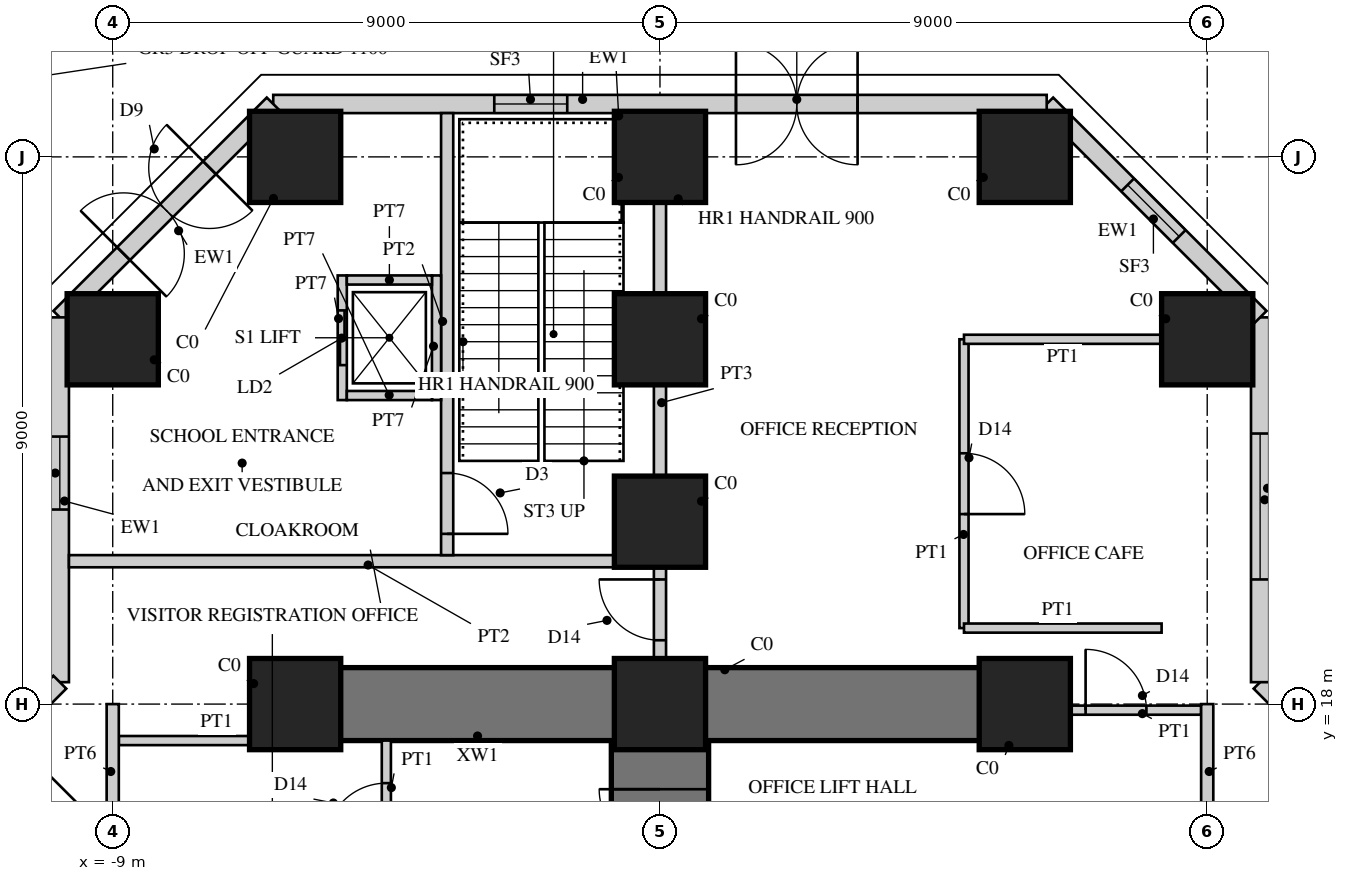
"""IFC4 building model, lengths in metres.
Left out: names, types, materials, properties, quantities, classifications, styles, units other than length and angle.
Written with IfcOpenShell. Run it as: python <this file> out.ifc"""

import sys

from ifc_helpers import new_model, si_unit, direction, frame, frame_2d, origin, origin_2d, place, context, subcontext, project, spatial, rectangle, hollow_rectangle, extrude, element, fill, save


model = new_model("IFC4")
c1 = context("Model", 3, precision=1e-05, world=origin(), true_north=direction((0.0, 1.0)))
c2 = subcontext(c1, "Body", "Model", "MODEL_VIEW")
j1 = project(units=[si_unit("LENGTHUNIT", "METRE"), si_unit("PLANEANGLEUNIT", "RADIAN")], contexts=[c1])
p1 = place(None, origin())
s1 = spatial("IfcSite", under=j1, at=p1, CompositionType="ELEMENT")
p2 = place(p1, origin())
s2 = spatial("IfcBuilding", under=s1, at=p2, CompositionType="ELEMENT")
p3 = place(p2, origin())
s3 = spatial("IfcBuildingStorey", under=s2, at=p3, CompositionType="ELEMENT", Elevation=0.0)
p4 = place(p3, frame((0.0, 9.0, 0.0), z_axis=(0.0, 0.0, 1.0), x_axis=(0.0, 1.0, 0.0)))
e1 = element("IfcWall", 1, at=p4, inside=s3, PredefinedType="SHEAR", context=c2, shape_type="SweptSolid", body=[
    extrude(rectangle(XDim=9.0, YDim=1.6, at=frame_2d((4.5, 0.0))), origin(), (0.0, 0.0, 1.0), 5.0),
])
p5 = place(p4, frame((6.6, 0.0, 0.0)))
e2 = element("IfcOpeningElement", 2, at=p5, cuts=e1, PredefinedType="OPENING", context=c2, shape_type="SweptSolid", body=[
    extrude(rectangle(XDim=1.0, YDim=2.2, at=frame_2d((0.5, 1.1))), frame((0.0, 0.81, 0.0), z_axis=(0.0, -1.0, 0.0), x_axis=(1.0, 0.0, 0.0)), (0.0, 0.0, 1.0), 1.62),
])
for number, where, z_axis, x_axis in (
    (3, (0.0, 18.0, 0.0), (0.0, 0.0, 1.0), (-1.0, 0.0, 0.0)),
    (4, (0.0, 18.0, 0.0), (0.0, 0.0, 1.0), (1.0, 0.0, 0.0)),
):
    element("IfcWall", number, at=place(p3, frame(where, z_axis=z_axis, x_axis=x_axis)), inside=s3, PredefinedType="SHEAR", context=c2, shape_type="SweptSolid", body=[
        extrude(rectangle(XDim=6.0, YDim=1.2, at=frame_2d((3.0, 0.0))), origin(), (0.0, 0.0, 1.0), 5.0),
    ])
for number, where, z_axis, x_axis in (
    (5, (9.0, 24.0, 0.0), (0.0, 0.0, 1.0), (1.0, 0.0, 0.0)),
    (6, (-9.0, 24.0, 0.0), (0.0, 0.0, 1.0), (1.0, 0.0, 0.0)),
    (7, (6.0, 27.0, 0.0), (0.0, 0.0, 1.0), (1.0, 0.0, 0.0)),
    (8, (0.0, 27.0, 0.0), (0.0, 0.0, 1.0), (1.0, 0.0, 0.0)),
    (9, (-6.0, 27.0, 0.0), (0.0, 0.0, 1.0), (1.0, 0.0, 0.0)),
    (10, (6.0, 18.0, 0.0), (0.0, 0.0, 1.0), (1.0, 0.0, 0.0)),
    (11, (0.0, 18.0, 0.0), (0.0, 0.0, 1.0), (1.0, 0.0, 0.0)),
    (12, (-6.0, 18.0, 0.0), (0.0, 0.0, 1.0), (1.0, 0.0, 0.0)),
    (13, (0.0, 21.0, 0.0), (0.0, 0.0, 1.0), (1.0, 0.0, 0.0)),
    (14, (0.0, 24.0, 0.0), (0.0, 0.0, 1.0), (1.0, 0.0, 0.0)),
):
    element("IfcColumn", number, at=place(p3, frame(where, z_axis=z_axis, x_axis=x_axis)), inside=s3, PredefinedType="COLUMN", context=c2, shape_type="SweptSolid", body=[
        extrude(rectangle(XDim=1.5, YDim=1.5, at=origin_2d()), origin(), (0.0, 0.0, 1.0), 5.0),
    ])
p6 = place(p3, frame((18.36, 9.87, 0.0), z_axis=(0.0, 0.0, 1.0), x_axis=(-0.707106781187, 0.707106781187, 0.0)))
e15 = element("IfcWall", 15, at=p6, inside=s3, PredefinedType="SOLIDWALL", context=c2, shape_type="SweptSolid", body=[
    extrude(rectangle(XDim=12.007, YDim=0.3, at=frame_2d((6.003, 0.0))), origin(), (0.0, 0.0, 1.0), 4.8),
])
p7 = place(p6, frame((1.034, 0.0, 0.3)))
e16 = element("IfcOpeningElement", 16, at=p7, cuts=e15, PredefinedType="OPENING", context=c2, shape_type="SweptSolid", body=[
    extrude(rectangle(XDim=3.6, YDim=3.9, at=frame_2d((1.8, 1.95))), frame((0.0, 0.16, 0.0), z_axis=(0.0, -1.0, 0.0), x_axis=(1.0, 0.0, 0.0)), (0.0, 0.0, 1.0), 0.32),
])
p8 = place(p6, frame((8.637, 0.0, 0.3)))
e17 = element("IfcOpeningElement", 17, at=p8, cuts=e15, PredefinedType="OPENING", context=c2, shape_type="SweptSolid", body=[
    extrude(rectangle(XDim=2.4, YDim=3.9, at=frame_2d((1.2, 1.95))), frame((0.0, 0.16, 0.0), z_axis=(0.0, -1.0, 0.0), x_axis=(1.0, 0.0, 0.0)), (0.0, 0.0, 1.0), 0.32),
])
p9 = place(p3, frame((9.87, 18.36, 0.0), z_axis=(0.0, 0.0, 1.0), x_axis=(0.0, 1.0, 0.0)))
e18 = element("IfcWall", 18, at=p9, inside=s3, PredefinedType="SOLIDWALL", context=c2, shape_type="SweptSolid", body=[
    extrude(rectangle(XDim=6.0, YDim=0.3, at=frame_2d((3.0, 0.0))), origin(), (0.0, 0.0, 1.0), 4.8),
])
p10 = place(p9, frame((1.69, 0.0, 0.3)))
e19 = element("IfcOpeningElement", 19, at=p10, cuts=e18, PredefinedType="OPENING", context=c2, shape_type="SweptSolid", body=[
    extrude(rectangle(XDim=2.4, YDim=3.9, at=frame_2d((1.2, 1.95))), frame((0.0, 0.16, 0.0), z_axis=(0.0, -1.0, 0.0), x_axis=(1.0, 0.0, 0.0)), (0.0, 0.0, 1.0), 0.32),
])
p11 = place(p3, frame((9.87, 24.36, 0.0), z_axis=(0.0, 0.0, 1.0), x_axis=(-0.707106781187, 0.707106781187, 0.0)))
e20 = element("IfcWall", 20, at=p11, inside=s3, PredefinedType="SOLIDWALL", context=c2, shape_type="SweptSolid", body=[
    extrude(rectangle(XDim=4.964, YDim=0.3, at=frame_2d((2.482, 0.0))), origin(), (0.0, 0.0, 1.0), 4.8),
])
p12 = place(p11, frame((1.882, 0.0, 0.3)))
e21 = element("IfcOpeningElement", 21, at=p12, cuts=e20, PredefinedType="OPENING", context=c2, shape_type="SweptSolid", body=[
    extrude(rectangle(XDim=1.2, YDim=3.9, at=frame_2d((0.6, 1.95))), frame((0.0, 0.16, 0.0), z_axis=(0.0, -1.0, 0.0), x_axis=(1.0, 0.0, 0.0)), (0.0, 0.0, 1.0), 0.32),
])
p13 = place(p3, frame((6.36, 27.87, 0.0), z_axis=(0.0, 0.0, 1.0), x_axis=(-1.0, 0.0, 0.0)))
e22 = element("IfcWall", 22, at=p13, inside=s3, PredefinedType="SOLIDWALL", context=c2, shape_type="SweptSolid", body=[
    extrude(rectangle(XDim=12.721, YDim=0.3, at=frame_2d((6.36, 0.0))), origin(), (0.0, 0.0, 1.0), 4.8),
])
p14 = place(p13, frame((3.11, 0.0, 0.0)))
e23 = element("IfcOpeningElement", 23, at=p14, cuts=e22, PredefinedType="OPENING", context=c2, shape_type="SweptSolid", body=[
    extrude(rectangle(XDim=2.0, YDim=2.6, at=frame_2d((1.0, 1.3))), frame((0.0, 0.16, 0.0), z_axis=(0.0, -1.0, 0.0), x_axis=(1.0, 0.0, 0.0)), (0.0, 0.0, 1.0), 0.32),
])
p15 = place(p13, frame((7.885, 0.0, 0.3)))
e24 = element("IfcOpeningElement", 24, at=p15, cuts=e22, PredefinedType="OPENING", context=c2, shape_type="SweptSolid", body=[
    extrude(rectangle(XDim=1.2, YDim=3.9, at=frame_2d((0.6, 1.95))), frame((0.0, 0.16, 0.0), z_axis=(0.0, -1.0, 0.0), x_axis=(1.0, 0.0, 0.0)), (0.0, 0.0, 1.0), 0.32),
])
p16 = place(p3, frame((-6.36, 27.87, 0.0), z_axis=(0.0, 0.0, 1.0), x_axis=(-0.707106781187, -0.707106781187, 0.0)))
e25 = element("IfcWall", 25, at=p16, inside=s3, PredefinedType="SOLIDWALL", context=c2, shape_type="SweptSolid", body=[
    extrude(rectangle(XDim=4.964, YDim=0.3, at=frame_2d((2.482, 0.0))), origin(), (0.0, 0.0, 1.0), 4.8),
])
p17 = place(p16, frame((1.482, 0.0, 0.0)))
e26 = element("IfcOpeningElement", 26, at=p17, cuts=e25, PredefinedType="OPENING", context=c2, shape_type="SweptSolid", body=[
    extrude(rectangle(XDim=2.0, YDim=2.6, at=frame_2d((1.0, 1.3))), frame((0.0, 0.16, 0.0), z_axis=(0.0, -1.0, 0.0), x_axis=(1.0, 0.0, 0.0)), (0.0, 0.0, 1.0), 0.32),
])
p18 = place(p3, frame((-9.87, 24.36, 0.0), z_axis=(0.0, 0.0, 1.0), x_axis=(0.0, -1.0, 0.0)))
e27 = element("IfcWall", 27, at=p18, inside=s3, PredefinedType="SOLIDWALL", context=c2, shape_type="SweptSolid", body=[
    extrude(rectangle(XDim=6.0, YDim=0.3, at=frame_2d((3.0, 0.0))), origin(), (0.0, 0.0, 1.0), 4.8),
])
p19 = place(p18, frame((1.96, 0.0, 0.3)))
e28 = element("IfcOpeningElement", 28, at=p19, cuts=e27, PredefinedType="OPENING", context=c2, shape_type="SweptSolid", body=[
    extrude(rectangle(XDim=1.2, YDim=3.9, at=frame_2d((0.6, 1.95))), frame((0.0, 0.16, 0.0), z_axis=(0.0, -1.0, 0.0), x_axis=(1.0, 0.0, 0.0)), (0.0, 0.0, 1.0), 0.32),
])
p20 = place(p3, frame((-9.87, 18.36, 0.0), z_axis=(0.0, 0.0, 1.0), x_axis=(-0.707106781187, -0.707106781187, 0.0)))
e29 = element("IfcWall", 29, at=p20, inside=s3, PredefinedType="SOLIDWALL", context=c2, shape_type="SweptSolid", body=[
    extrude(rectangle(XDim=12.007, YDim=0.3, at=frame_2d((6.003, 0.0))), origin(), (0.0, 0.0, 1.0), 4.8),
])
p21 = place(p20, frame((1.204, 0.0, 0.0)))
e30 = element("IfcOpeningElement", 30, at=p21, cuts=e29, PredefinedType="OPENING", context=c2, shape_type="SweptSolid", body=[
    extrude(rectangle(XDim=3.6, YDim=4.2, at=frame_2d((1.8, 2.1))), frame((0.0, 0.16, 0.0), z_axis=(0.0, -1.0, 0.0), x_axis=(1.0, 0.0, 0.0)), (0.0, 0.0, 1.0), 0.32),
])
p22 = place(p3, frame((-4.5, 15.0, 0.0), z_axis=(0.0, 0.0, 1.0), x_axis=(0.0, 1.0, 0.0)))
e31 = element("IfcWall", 31, at=p22, inside=s3, PredefinedType="PARTITIONING", context=c2, shape_type="SweptSolid", body=[
    extrude(rectangle(XDim=2.4, YDim=0.15, at=frame_2d((1.2, 0.0))), origin(), (0.0, 0.0, 1.0), 4.8),
])
p23 = place(p22, frame((0.7, 0.0, 0.0)))
e32 = element("IfcOpeningElement", 32, at=p23, cuts=e31, PredefinedType="OPENING", context=c2, shape_type="SweptSolid", body=[
    extrude(rectangle(XDim=1.0, YDim=2.2, at=frame_2d((0.5, 1.1))), frame((0.0, 0.085, 0.0), z_axis=(0.0, -1.0, 0.0), x_axis=(1.0, 0.0, 0.0)), (0.0, 0.0, 1.0), 0.17),
])
p24 = place(p3, frame((-0.1, 20.35, 0.0), z_axis=(0.0, 0.0, 1.0), x_axis=(-1.0, 0.0, 0.0)))
e33 = element("IfcWall", 33, at=p24, inside=s3, PredefinedType="SOLIDWALL", context=c2, shape_type="SweptSolid", body=[
    extrude(rectangle(XDim=9.62, YDim=0.2, at=frame_2d((4.81, 0.0))), origin(), (0.0, 0.0, 1.0), 4.8),
])
p25 = place(p3, frame((-3.5, 20.45, 0.0), z_axis=(0.0, 0.0, 1.0), x_axis=(0.0, 1.0, 0.0)))
e34 = element("IfcWall", 34, at=p25, inside=s3, PredefinedType="SOLIDWALL", context=c2, shape_type="SweptSolid", body=[
    extrude(rectangle(XDim=7.27, YDim=0.2, at=frame_2d((3.635, 0.0))), origin(), (0.0, 0.0, 1.0), 4.8),
])
p26 = place(p25, frame((0.35, 0.0, 0.0)))
e35 = element("IfcOpeningElement", 35, at=p26, cuts=e34, PredefinedType="OPENING", context=c2, shape_type="SweptSolid", body=[
    extrude(rectangle(XDim=1.0, YDim=2.1, at=frame_2d((0.5, 1.05))), frame((0.0, 0.11, 0.0), z_axis=(0.0, -1.0, 0.0), x_axis=(1.0, 0.0, 0.0)), (0.0, 0.0, 1.0), 0.22),
])
p27 = place(p3, frame((-3.675, 23.0, 0.0), z_axis=(0.0, 0.0, 1.0), x_axis=(0.0, 1.0, 0.0)))
e36 = element("IfcWall", 36, at=p27, inside=s3, PredefinedType="PARTITIONING", context=c2, shape_type="SweptSolid", body=[
    extrude(rectangle(XDim=2.05, YDim=0.15, at=frame_2d((1.025, 0.0))), origin(), (0.0, 0.0, 1.0), 4.8),
])
p28 = place(p3, frame((-5.225, 23.0, 0.0), z_axis=(0.0, 0.0, 1.0), x_axis=(0.0, 1.0, 0.0)))
e37 = element("IfcWall", 37, at=p28, inside=s3, PredefinedType="PARTITIONING", context=c2, shape_type="SweptSolid", body=[
    extrude(rectangle(XDim=2.05, YDim=0.15, at=frame_2d((1.025, 0.0))), origin(), (0.0, 0.0, 1.0), 4.8),
])
p29 = place(p28, frame((0.575, 0.0, 0.0)))
e38 = element("IfcOpeningElement", 38, at=p29, cuts=e37, PredefinedType="OPENING", context=c2, shape_type="SweptSolid", body=[
    extrude(rectangle(XDim=0.9, YDim=2.1, at=frame_2d((0.45, 1.05))), frame((0.0, 0.085, 0.0), z_axis=(0.0, -1.0, 0.0), x_axis=(1.0, 0.0, 0.0)), (0.0, 0.0, 1.0), 0.17),
])
for number, where, z_axis, x_axis in (
    (39, (-3.75, 23.075, 0.0), (0.0, 0.0, 1.0), (-1.0, 0.0, 0.0)),
    (40, (-3.75, 24.975, 0.0), (0.0, 0.0, 1.0), (-1.0, 0.0, 0.0)),
):
    element("IfcWall", number, at=place(p3, frame(where, z_axis=z_axis, x_axis=x_axis)), inside=s3, PredefinedType="PARTITIONING", context=c2, shape_type="SweptSolid", body=[
        extrude(rectangle(XDim=1.4, YDim=0.15, at=frame_2d((0.7, 0.0))), origin(), (0.0, 0.0, 1.0), 4.8),
    ])
p30 = place(p3, frame((5.0, 19.25, 0.0), z_axis=(0.0, 0.0, 1.0), x_axis=(0.0, 1.0, 0.0)))
e41 = element("IfcWall", 41, at=p30, inside=s3, PredefinedType="PARTITIONING", context=c2, shape_type="SweptSolid", body=[
    extrude(rectangle(XDim=4.75, YDim=0.15, at=frame_2d((2.375, 0.0))), origin(), (0.0, 0.0, 1.0), 4.8),
])
p31 = place(p30, frame((1.875, 0.0, 0.0)))
e42 = element("IfcOpeningElement", 42, at=p31, cuts=e41, PredefinedType="OPENING", context=c2, shape_type="SweptSolid", body=[
    extrude(rectangle(XDim=1.0, YDim=2.2, at=frame_2d((0.5, 1.1))), frame((0.0, 0.085, 0.0), z_axis=(0.0, -1.0, 0.0), x_axis=(1.0, 0.0, 0.0)), (0.0, 0.0, 1.0), 0.17),
])
for number, where, z_axis, x_axis in (
    (43, (8.25, 19.25, 0.0), (0.0, 0.0, 1.0), (-1.0, 0.0, 0.0)),
    (44, (8.25, 24.0, 0.0), (0.0, 0.0, 1.0), (-1.0, 0.0, 0.0)),
):
    element("IfcWall", number, at=place(p3, frame(where, z_axis=z_axis, x_axis=x_axis)), inside=s3, PredefinedType="PARTITIONING", context=c2, shape_type="SweptSolid", body=[
        extrude(rectangle(XDim=3.25, YDim=0.15, at=frame_2d((1.625, 0.0))), origin(), (0.0, 0.0, 1.0), 4.8),
    ])
p32 = place(p3, frame((-6.75, 17.4, 0.0), z_axis=(0.0, 0.0, 1.0), x_axis=(-1.0, 0.0, 0.0)))
e45 = element("IfcWall", 45, at=p32, inside=s3, PredefinedType="PARTITIONING", context=c2, shape_type="SweptSolid", body=[
    extrude(rectangle(XDim=2.15, YDim=0.15, at=frame_2d((1.075, 0.0))), origin(), (0.0, 0.0, 1.0), 4.8),
])
p33 = place(p3, frame((6.75, 17.9, 0.0), z_axis=(0.0, 0.0, 1.0), x_axis=(1.0, 0.0, 0.0)))
e46 = element("IfcWall", 46, at=p33, inside=s3, PredefinedType="PARTITIONING", context=c2, shape_type="SweptSolid", body=[
    extrude(rectangle(XDim=2.15, YDim=0.15, at=frame_2d((1.075, 0.0))), origin(), (0.0, 0.0, 1.0), 3.85),
])
p34 = place(p33, frame((0.25, 0.0, 0.0)))
e47 = element("IfcOpeningElement", 47, at=p34, cuts=e46, PredefinedType="OPENING", context=c2, shape_type="SweptSolid", body=[
    extrude(rectangle(XDim=1.0, YDim=2.2, at=frame_2d((0.5, 1.1))), frame((0.0, 0.085, 0.0), z_axis=(0.0, -1.0, 0.0), x_axis=(1.0, 0.0, 0.0)), (0.0, 0.0, 1.0), 0.17),
])
for number, where, z_axis, x_axis in (
    (48, (-9.0, 15.75, 0.0), (0.0, 0.0, 1.0), (0.0, 1.0, 0.0)),
    (49, (9.0, 18.0, 0.0), (0.0, 0.0, 1.0), (0.0, -1.0, 0.0)),
):
    element("IfcWall", number, at=place(p3, frame(where, z_axis=z_axis, x_axis=x_axis)), inside=s3, PredefinedType="SOLIDWALL", context=c2, shape_type="SweptSolid", body=[
        extrude(rectangle(XDim=2.25, YDim=0.2, at=frame_2d((1.125, 0.0))), origin(), (0.0, 0.0, 1.0), 3.8),
    ])
p35 = place(p3, frame((0.0, 18.0, 0.0), z_axis=(0.0, 0.0, 1.0), x_axis=(0.0, 1.0, 0.0)))
e50 = element("IfcWall", 50, at=p35, inside=s3, PredefinedType="SOLIDWALL", context=c2, shape_type="SweptSolid", body=[
    extrude(rectangle(XDim=3.0, YDim=0.2, at=frame_2d((1.5, 0.0))), origin(), (0.0, 0.0, 1.0), 4.8),
])
p36 = place(p35, frame((1.05, 0.0, 0.0)))
e51 = element("IfcOpeningElement", 51, at=p36, cuts=e50, PredefinedType="OPENING", context=c2, shape_type="SweptSolid", body=[
    extrude(rectangle(XDim=1.0, YDim=2.2, at=frame_2d((0.5, 1.1))), frame((0.0, 0.11, 0.0), z_axis=(0.0, -1.0, 0.0), x_axis=(1.0, 0.0, 0.0)), (0.0, 0.0, 1.0), 0.22),
])
p37 = place(p3, frame((0.0, 21.0, 0.0), z_axis=(0.0, 0.0, 1.0), x_axis=(0.0, 1.0, 0.0)))
e52 = element("IfcWall", 52, at=p37, inside=s3, PredefinedType="SOLIDWALL", context=c2, shape_type="SweptSolid", body=[
    extrude(rectangle(XDim=6.0, YDim=0.2, at=frame_2d((3.0, 0.0))), origin(), (0.0, 0.0, 1.0), 3.8),
])
p38 = place(p10, origin())
e53 = element("IfcWindow", 53, at=p38, inside=s3, PartitioningType="SINGLE_PANEL", PredefinedType="WINDOW", context=c2, shape_type="SweptSolid", body=[
    extrude(hollow_rectangle(XDim=2.4, YDim=3.9, WallThickness=0.06, at=frame_2d((1.2, 1.95))), frame((0.0, 0.03, 0.0), z_axis=(0.0, -1.0, 0.0), x_axis=(1.0, 0.0, 0.0)), (0.0, 0.0, 1.0), 0.06),
    extrude(rectangle(XDim=2.279, YDim=3.779, at=frame_2d((1.2, 1.95))), frame((0.0, 0.03, 0.0), z_axis=(0.0, -1.0, 0.0), x_axis=(1.0, 0.0, 0.0)), (0.0, 0.0, 1.0), 0.06),
])
fill(e19, e53)
p39 = place(p12, origin())
e54 = element("IfcWindow", 54, at=p39, inside=s3, PartitioningType="SINGLE_PANEL", PredefinedType="WINDOW", context=c2, shape_type="SweptSolid", body=[
    extrude(hollow_rectangle(XDim=1.2, YDim=3.9, WallThickness=0.06, at=frame_2d((0.6, 1.95))), frame((0.0, 0.03, 0.0), z_axis=(0.0, -1.0, 0.0), x_axis=(1.0, 0.0, 0.0)), (0.0, 0.0, 1.0), 0.06),
    extrude(rectangle(XDim=1.079, YDim=3.779, at=frame_2d((0.6, 1.95))), frame((0.0, 0.03, 0.0), z_axis=(0.0, -1.0, 0.0), x_axis=(1.0, 0.0, 0.0)), (0.0, 0.0, 1.0), 0.06),
])
fill(e21, e54)
p40 = place(p14, origin())
e55 = element("IfcDoor", 55, at=p40, inside=s3, OperationType="DOUBLE_DOOR_DOUBLE_SWING", PredefinedType="DOOR", context=c2, shape_type="SweptSolid", body=[
    extrude(hollow_rectangle(XDim=2.0, YDim=2.6, WallThickness=0.06, at=frame_2d((1.0, 1.3))), frame((0.0, 0.025, 0.0), z_axis=(0.0, -1.0, 0.0), x_axis=(1.0, 0.0, 0.0)), (0.0, 0.0, 1.0), 0.05),
    extrude(rectangle(XDim=1.879, YDim=2.479, at=frame_2d((1.0, 1.3))), frame((0.0, 0.025, 0.0), z_axis=(0.0, -1.0, 0.0), x_axis=(1.0, 0.0, 0.0)), (0.0, 0.0, 1.0), 0.05),
])
fill(e23, e55)
p41 = place(p15, origin())
e56 = element("IfcWindow", 56, at=p41, inside=s3, PartitioningType="SINGLE_PANEL", PredefinedType="WINDOW", context=c2, shape_type="SweptSolid", body=[
    extrude(hollow_rectangle(XDim=1.2, YDim=3.9, WallThickness=0.06, at=frame_2d((0.6, 1.95))), frame((0.0, 0.03, 0.0), z_axis=(0.0, -1.0, 0.0), x_axis=(1.0, 0.0, 0.0)), (0.0, 0.0, 1.0), 0.06),
    extrude(rectangle(XDim=1.079, YDim=3.779, at=frame_2d((0.6, 1.95))), frame((0.0, 0.03, 0.0), z_axis=(0.0, -1.0, 0.0), x_axis=(1.0, 0.0, 0.0)), (0.0, 0.0, 1.0), 0.06),
])
fill(e24, e56)
p42 = place(p19, origin())
e57 = element("IfcWindow", 57, at=p42, inside=s3, PartitioningType="SINGLE_PANEL", PredefinedType="WINDOW", context=c2, shape_type="SweptSolid", body=[
    extrude(hollow_rectangle(XDim=1.2, YDim=3.9, WallThickness=0.06, at=frame_2d((0.6, 1.95))), frame((0.0, 0.03, 0.0), z_axis=(0.0, -1.0, 0.0), x_axis=(1.0, 0.0, 0.0)), (0.0, 0.0, 1.0), 0.06),
    extrude(rectangle(XDim=1.079, YDim=3.779, at=frame_2d((0.6, 1.95))), frame((0.0, 0.03, 0.0), z_axis=(0.0, -1.0, 0.0), x_axis=(1.0, 0.0, 0.0)), (0.0, 0.0, 1.0), 0.06),
])
fill(e28, e57)
p43 = place(p23, origin())
e58 = element("IfcDoor", 58, at=p43, inside=s3, OperationType="SINGLE_SWING_LEFT", PredefinedType="DOOR", context=c2, shape_type="SweptSolid", body=[
    extrude(rectangle(XDim=1.0, YDim=2.2, at=frame_2d((0.5, 1.1))), frame((0.0, 0.025, 0.0), z_axis=(0.0, -1.0, 0.0), x_axis=(1.0, 0.0, 0.0)), (0.0, 0.0, 1.0), 0.05),
])
fill(e32, e58)
p44 = place(p26, frame((1.0, 0.0, 0.0), z_axis=(0.0, 0.0, 1.0), x_axis=(-1.0, 0.0, 0.0)))
e59 = element("IfcDoor", 59, at=p44, inside=s3, OperationType="SINGLE_SWING_RIGHT", PredefinedType="DOOR", context=c2, shape_type="SweptSolid", body=[
    extrude(rectangle(XDim=1.0, YDim=2.1, at=frame_2d((0.5, 1.05))), frame((0.0, 0.025, 0.0), z_axis=(0.0, -1.0, 0.0), x_axis=(1.0, 0.0, 0.0)), (0.0, 0.0, 1.0), 0.05),
])
fill(e35, e59)
p45 = place(p29, origin())
e60 = element("IfcDoor", 60, at=p45, inside=s3, OperationType="DOUBLE_DOOR_SLIDING", PredefinedType="DOOR", context=c2, shape_type="SweptSolid", body=[
    extrude(rectangle(XDim=0.9, YDim=2.1, at=frame_2d((0.45, 1.05))), frame((0.0, 0.025, 0.0), z_axis=(0.0, -1.0, 0.0), x_axis=(1.0, 0.0, 0.0)), (0.0, 0.0, 1.0), 0.05),
])
fill(e38, e60)
p46 = place(p31, frame((1.0, 0.0, 0.0), z_axis=(0.0, 0.0, 1.0), x_axis=(-1.0, 0.0, 0.0)))
e61 = element("IfcDoor", 61, at=p46, inside=s3, OperationType="SINGLE_SWING_RIGHT", PredefinedType="DOOR", context=c2, shape_type="SweptSolid", body=[
    extrude(rectangle(XDim=1.0, YDim=2.2, at=frame_2d((0.5, 1.1))), frame((0.0, 0.025, 0.0), z_axis=(0.0, -1.0, 0.0), x_axis=(1.0, 0.0, 0.0)), (0.0, 0.0, 1.0), 0.05),
])
fill(e42, e61)
p47 = place(p34, origin())
e62 = element("IfcDoor", 62, at=p47, inside=s3, OperationType="SINGLE_SWING_LEFT", PredefinedType="DOOR", context=c2, shape_type="SweptSolid", body=[
    extrude(rectangle(XDim=1.0, YDim=2.2, at=frame_2d((0.5, 1.1))), frame((0.0, 0.025, 0.0), z_axis=(0.0, -1.0, 0.0), x_axis=(1.0, 0.0, 0.0)), (0.0, 0.0, 1.0), 0.05),
])
fill(e47, e62)
p48 = place(p5, origin())
e63 = element("IfcDoor", 63, at=p48, inside=s3, OperationType="SINGLE_SWING_RIGHT", PredefinedType="DOOR", context=c2, shape_type="SweptSolid", body=[
    extrude(rectangle(XDim=1.0, YDim=2.2, at=frame_2d((0.5, 1.1))), frame((0.0, 0.025, 0.0), z_axis=(0.0, -1.0, 0.0), x_axis=(1.0, 0.0, 0.0)), (0.0, 0.0, 1.0), 0.05),
])
fill(e2, e63)
p49 = place(p36, origin())
e64 = element("IfcDoor", 64, at=p49, inside=s3, OperationType="SINGLE_SWING_RIGHT", PredefinedType="DOOR", context=c2, shape_type="SweptSolid", body=[
    extrude(rectangle(XDim=1.0, YDim=2.2, at=frame_2d((0.5, 1.1))), frame((0.0, 0.025, 0.0), z_axis=(0.0, -1.0, 0.0), x_axis=(1.0, 0.0, 0.0)), (0.0, 0.0, 1.0), 0.05),
])
fill(e51, e64)
p50 = place(p17, origin())
e65 = element("IfcDoor", 65, at=p50, inside=s3, OperationType="DOUBLE_DOOR_DOUBLE_SWING", PredefinedType="DOOR", context=c2, shape_type="SweptSolid", body=[
    extrude(hollow_rectangle(XDim=2.0, YDim=2.6, WallThickness=0.06, at=frame_2d((1.0, 1.3))), frame((0.0, 0.025, 0.0), z_axis=(0.0, -1.0, 0.0), x_axis=(1.0, 0.0, 0.0)), (0.0, 0.0, 1.0), 0.05),
    extrude(rectangle(XDim=1.879, YDim=2.479, at=frame_2d((1.0, 1.3))), frame((0.0, 0.025, 0.0), z_axis=(0.0, -1.0, 0.0), x_axis=(1.0, 0.0, 0.0)), (0.0, 0.0, 1.0), 0.05),
])
fill(e26, e65)
save(model, sys.argv[1])
